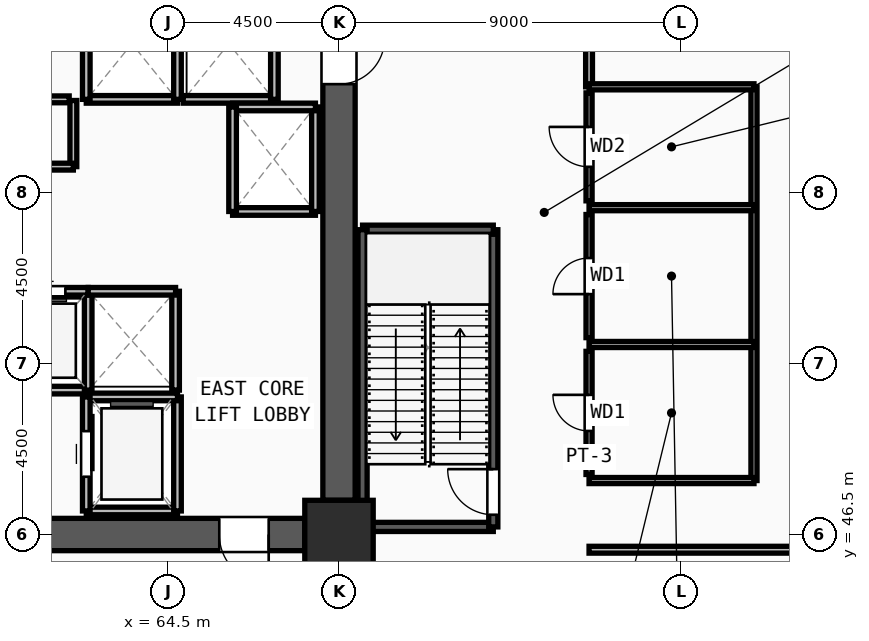
"""IFC4 building model, lengths in metres.
Left out: names, types, materials, properties, quantities, classifications, styles, units other than length and angle.
Written with IfcOpenShell. Run it as: python <this file> out.ifc"""

import sys

from ifc_helpers import new_model, si_unit, direction, frame, frame_2d, origin, origin_2d, place, context, subcontext, project, spatial, rectangle, extrude, source, transform, mapped, element, fill, save


model = new_model("IFC4")
c1 = context("Model", 3, precision=1e-05, world=origin(), true_north=direction((0.0, 1.0)))
c2 = subcontext(c1, "Body", "Model", "MODEL_VIEW")
j1 = project(units=[si_unit("LENGTHUNIT", "METRE"), si_unit("PLANEANGLEUNIT", "RADIAN")], contexts=[c1])
p1 = place(None, origin())
s1 = spatial("IfcSite", under=j1, at=p1, CompositionType="ELEMENT")
p2 = place(p1, origin())
s2 = spatial("IfcBuilding", under=s1, at=p2, CompositionType="ELEMENT")
p3 = place(p2, frame((0.0, 0.0, 23.4)))
s3 = spatial("IfcBuildingStorey", under=s2, at=p3, CompositionType="ELEMENT", Elevation=23.4)
m1 = source(origin(), c2, "Body", "SweptSolid", [
    extrude(rectangle(XDim=1.8, YDim=1.8, at=origin_2d()), origin(), (0.0, 0.0, 1.0), 5.1),
])
p4 = place(p3, frame((69.0, 46.5, 0.0), z_axis=(0.0, 0.0, 1.0), x_axis=(1.0, 0.0, 0.0)))
e1 = element("IfcColumn", 1, at=p4, inside=s3, PredefinedType="COLUMN", context=c2, shape_type="MappedRepresentation", body=[
    mapped(m1, transform((0.0, 0.0, 0.0), x_axis=(1.0, 0.0, 0.0), y_axis=(0.0, 1.0, 0.0), z_axis=(0.0, 0.0, 1.0), scale=1.0)),
])
p5 = place(p3, frame((69.0, 60.6, 0.0), z_axis=(0.0, 0.0, 1.0), x_axis=(0.0, -1.0, 0.0)))
e2 = element("IfcWall", 2, at=p5, inside=s3, PredefinedType="SHEAR", context=c2, shape_type="SweptSolid", body=[
    extrude(rectangle(XDim=13.2, YDim=0.85, at=frame_2d((6.6, 0.0))), origin(), (0.0, 0.0, 1.0), 4.82),
])
m2 = source(origin(), c2, "Body", "SweptSolid", [
    extrude(rectangle(XDim=1.2, YDim=2.2, at=frame_2d((0.6, 1.1))), frame((0.0, 0.435, 0.0), z_axis=(0.0, -1.0, 0.0), x_axis=(1.0, 0.0, 0.0)), (0.0, 0.0, 1.0), 0.87),
])
p6 = place(p5, frame((1.05, 0.0, 0.0)))
e3 = element("IfcOpeningElement", 3, at=p6, cuts=e2, PredefinedType="OPENING", context=c2, shape_type="MappedRepresentation", body=[
    mapped(m2, transform((0.0, 0.0, 0.0), x_axis=(1.0, 0.0, 0.0), y_axis=(0.0, 1.0, 0.0), z_axis=(0.0, 0.0, 1.0), scale=1.0)),
])
p7 = place(p3, frame((68.1, 46.5, 0.0), z_axis=(0.0, 0.0, 1.0), x_axis=(-1.0, 0.0, 0.0)))
e4 = element("IfcWall", 4, at=p7, inside=s3, PredefinedType="SHEAR", context=c2, shape_type="SweptSolid", body=[
    extrude(rectangle(XDim=7.2, YDim=0.85, at=frame_2d((3.6, 0.0))), origin(), (0.0, 0.0, 1.0), 4.82),
])
m3 = source(origin(), c2, "Body", "SweptSolid", [
    extrude(rectangle(XDim=1.3, YDim=2.2, at=frame_2d((0.65, 1.1))), frame((0.0, 0.435, 0.0), z_axis=(0.0, -1.0, 0.0), x_axis=(1.0, 0.0, 0.0)), (0.0, 0.0, 1.0), 0.87),
])
p8 = place(p7, frame((0.95, 0.0, 0.0)))
e5 = element("IfcOpeningElement", 5, at=p8, cuts=e4, PredefinedType="OPENING", context=c2, shape_type="MappedRepresentation", body=[
    mapped(m3, transform((0.0, 0.0, 0.0), x_axis=(1.0, 0.0, 0.0), y_axis=(0.0, 1.0, 0.0), z_axis=(0.0, 0.0, 1.0), scale=1.0)),
])
p9 = place(p3, frame((69.62, 46.7, 0.0), z_axis=(0.0, 0.0, 1.0), x_axis=(1.0, 0.0, 0.0)))
e6 = element("IfcWall", 6, at=p9, inside=s3, PredefinedType="SOLIDWALL", context=c2, shape_type="SweptSolid", body=[
    extrude(rectangle(XDim=3.44, YDim=0.24, at=frame_2d((1.72, 0.0))), origin(), (0.0, 0.0, 1.0), 3.335),
])
p10 = place(p3, frame((73.06, 46.7, 0.0), z_axis=(0.0, 0.0, 1.0), x_axis=(0.0, 1.0, 0.0)))
e7 = element("IfcWall", 7, at=p10, inside=s3, PredefinedType="SOLIDWALL", context=c2, shape_type="SweptSolid", body=[
    extrude(rectangle(XDim=7.82, YDim=0.24, at=frame_2d((3.91, 0.0))), origin(), (0.0, 0.0, 1.0), 4.82),
])
m4 = source(origin(), c2, "Body", "SweptSolid", [
    extrude(rectangle(XDim=1.2, YDim=2.2, at=frame_2d((0.6, 1.1))), frame((0.0, 0.13, 0.0), z_axis=(0.0, -1.0, 0.0), x_axis=(1.0, 0.0, 0.0)), (0.0, 0.0, 1.0), 0.26),
])
p11 = place(p10, frame((0.32, 0.0, 0.0)))
e8 = element("IfcOpeningElement", 8, at=p11, cuts=e7, PredefinedType="OPENING", context=c2, shape_type="MappedRepresentation", body=[
    mapped(m4, transform((0.0, 0.0, 0.0), x_axis=(1.0, 0.0, 0.0), y_axis=(0.0, 1.0, 0.0), z_axis=(0.0, 0.0, 1.0), scale=1.0)),
])
p12 = place(p3, frame((73.06, 54.52, 0.0), z_axis=(0.0, 0.0, 1.0), x_axis=(-1.0, 0.0, 0.0)))
e9 = element("IfcWall", 9, at=p12, inside=s3, PredefinedType="SOLIDWALL", context=c2, shape_type="SweptSolid", body=[
    extrude(rectangle(XDim=3.44, YDim=0.24, at=frame_2d((1.72, 0.0))), origin(), (0.0, 0.0, 1.0), 4.82),
])
p13 = place(p3, frame((69.62, 54.52, 0.0), z_axis=(0.0, 0.0, 1.0), x_axis=(0.0, -1.0, 0.0)))
e10 = element("IfcWall", 10, at=p13, inside=s3, PredefinedType="SOLIDWALL", context=c2, shape_type="SweptSolid", body=[
    extrude(rectangle(XDim=7.82, YDim=0.24, at=frame_2d((3.91, 0.0))), origin(), (0.0, 0.0, 1.0), 4.82),
])
p14 = place(p3, frame((62.35, 47.12, 0.0), z_axis=(0.0, 0.0, 1.0), x_axis=(1.0, 0.0, 0.0)))
e11 = element("IfcWall", 11, at=p14, inside=s3, PredefinedType="SOLIDWALL", context=c2, shape_type="SweptSolid", body=[
    extrude(rectangle(XDim=2.4, YDim=0.2, at=frame_2d((1.2, 0.0))), origin(), (0.0, 0.0, 1.0), 4.82),
])
p15 = place(p3, frame((64.75, 47.12, 0.0), z_axis=(0.0, 0.0, 1.0), x_axis=(0.0, 1.0, 0.0)))
e12 = element("IfcWall", 12, at=p15, inside=s3, PredefinedType="SOLIDWALL", context=c2, shape_type="SweptSolid", body=[
    extrude(rectangle(XDim=3.0, YDim=0.2, at=frame_2d((1.5, 0.0))), origin(), (0.0, 0.0, 1.0), 4.82),
])
p16 = place(p3, frame((64.75, 50.12, 0.0), z_axis=(0.0, 0.0, 1.0), x_axis=(-1.0, 0.0, 0.0)))
e13 = element("IfcWall", 13, at=p16, inside=s3, PredefinedType="SOLIDWALL", context=c2, shape_type="SweptSolid", body=[
    extrude(rectangle(XDim=2.4, YDim=0.2, at=frame_2d((1.2, 0.0))), origin(), (0.0, 0.0, 1.0), 4.82),
])
p17 = place(p3, frame((62.35, 50.12, 0.0), z_axis=(0.0, 0.0, 1.0), x_axis=(0.0, -1.0, 0.0)))
e14 = element("IfcWall", 14, at=p17, inside=s3, PredefinedType="SOLIDWALL", context=c2, shape_type="SweptSolid", body=[
    extrude(rectangle(XDim=3.0, YDim=0.2, at=frame_2d((1.5, 0.0))), origin(), (0.0, 0.0, 1.0), 4.82),
])
m5 = source(origin(), c2, "Body", "SweptSolid", [
    extrude(rectangle(XDim=1.2, YDim=2.3, at=frame_2d((0.6, 1.15))), frame((0.0, 0.11, 0.0), z_axis=(0.0, -1.0, 0.0), x_axis=(1.0, 0.0, 0.0)), (0.0, 0.0, 1.0), 0.22),
])
p18 = place(p17, frame((0.9, 0.0, 0.0)))
e15 = element("IfcOpeningElement", 15, at=p18, cuts=e14, PredefinedType="OPENING", context=c2, shape_type="MappedRepresentation", body=[
    mapped(m5, transform((0.0, 0.0, 0.0), x_axis=(1.0, 0.0, 0.0), y_axis=(0.0, 1.0, 0.0), z_axis=(0.0, 0.0, 1.0), scale=1.0)),
])
p19 = place(p3, frame((62.35, 57.95, 0.0), z_axis=(0.0, 0.0, 1.0), x_axis=(1.0, 0.0, 0.0)))
e16 = element("IfcWall", 16, at=p19, inside=s3, PredefinedType="SOLIDWALL", context=c2, shape_type="SweptSolid", body=[
    extrude(rectangle(XDim=2.4, YDim=0.2, at=frame_2d((1.2, 0.0))), origin(), (0.0, 0.0, 1.0), 4.82),
])
for number, where, z_axis, x_axis in (
    (17, (64.75, 57.95, 0.0), (0.0, 0.0, 1.0), (0.0, 1.0, 0.0)),
    (18, (62.35, 60.88, 0.0), (0.0, 0.0, 1.0), (0.0, -1.0, 0.0)),
):
    element("IfcWall", number, at=place(p3, frame(where, z_axis=z_axis, x_axis=x_axis)), inside=s3, PredefinedType="SOLIDWALL", context=c2, shape_type="SweptSolid", body=[
        extrude(rectangle(XDim=2.93, YDim=0.2, at=frame_2d((1.465, 0.0))), origin(), (0.0, 0.0, 1.0), 4.82),
    ])
p20 = place(p3, frame((64.9, 57.95, 0.0), z_axis=(0.0, 0.0, 1.0), x_axis=(1.0, 0.0, 0.0)))
e19 = element("IfcWall", 19, at=p20, inside=s3, PredefinedType="SOLIDWALL", context=c2, shape_type="SweptSolid", body=[
    extrude(rectangle(XDim=2.4, YDim=0.2, at=frame_2d((1.2, 0.0))), origin(), (0.0, 0.0, 1.0), 4.82),
])
p21 = place(p3, frame((67.3, 57.95, 0.0), z_axis=(0.0, 0.0, 1.0), x_axis=(0.0, 1.0, 0.0)))
e20 = element("IfcWall", 20, at=p21, inside=s3, PredefinedType="SOLIDWALL", context=c2, shape_type="SweptSolid", body=[
    extrude(rectangle(XDim=2.93, YDim=0.2, at=frame_2d((1.465, 0.0))), origin(), (0.0, 0.0, 1.0), 4.82),
])
p22 = place(p3, frame((66.2, 55.0, 0.0), z_axis=(0.0, 0.0, 1.0), x_axis=(1.0, 0.0, 0.0)))
e21 = element("IfcWall", 21, at=p22, inside=s3, PredefinedType="SOLIDWALL", context=c2, shape_type="SweptSolid", body=[
    extrude(rectangle(XDim=2.18, YDim=0.2, at=frame_2d((1.09, 0.0))), origin(), (0.0, 0.0, 1.0), 4.82),
])
p23 = place(p3, frame((68.38, 55.0, 0.0), z_axis=(0.0, 0.0, 1.0), x_axis=(0.0, 1.0, 0.0)))
e22 = element("IfcWall", 22, at=p23, inside=s3, PredefinedType="SOLIDWALL", context=c2, shape_type="SweptSolid", body=[
    extrude(rectangle(XDim=2.75, YDim=0.2, at=frame_2d((1.375, 0.0))), origin(), (0.0, 0.0, 1.0), 4.82),
])
p24 = place(p3, frame((68.38, 57.75, 0.0), z_axis=(0.0, 0.0, 1.0), x_axis=(-1.0, 0.0, 0.0)))
e23 = element("IfcWall", 23, at=p24, inside=s3, PredefinedType="SOLIDWALL", context=c2, shape_type="SweptSolid", body=[
    extrude(rectangle(XDim=2.18, YDim=0.2, at=frame_2d((1.09, 0.0))), origin(), (0.0, 0.0, 1.0), 4.82),
])
p25 = place(p3, frame((66.2, 57.75, 0.0), z_axis=(0.0, 0.0, 1.0), x_axis=(0.0, -1.0, 0.0)))
e24 = element("IfcWall", 24, at=p25, inside=s3, PredefinedType="SOLIDWALL", context=c2, shape_type="SweptSolid", body=[
    extrude(rectangle(XDim=2.75, YDim=0.2, at=frame_2d((1.375, 0.0))), origin(), (0.0, 0.0, 1.0), 4.82),
])
p26 = place(p3, frame((60.1, 50.3, 0.0), z_axis=(0.0, 0.0, 1.0), x_axis=(1.0, 0.0, 0.0)))
e25 = element("IfcWall", 25, at=p26, inside=s3, PredefinedType="SOLIDWALL", context=c2, shape_type="SweptSolid", body=[
    extrude(rectangle(XDim=2.3, YDim=0.2, at=frame_2d((1.15, 0.0))), origin(), (0.0, 0.0, 1.0), 4.82),
])
p27 = place(p3, frame((62.4, 50.3, 0.0), z_axis=(0.0, 0.0, 1.0), x_axis=(0.0, 1.0, 0.0)))
e26 = element("IfcWall", 26, at=p27, inside=s3, PredefinedType="SOLIDWALL", context=c2, shape_type="SweptSolid", body=[
    extrude(rectangle(XDim=2.6, YDim=0.2, at=frame_2d((1.3, 0.0))), origin(), (0.0, 0.0, 1.0), 4.82),
])
p28 = place(p3, frame((62.4, 52.9, 0.0), z_axis=(0.0, 0.0, 1.0), x_axis=(-1.0, 0.0, 0.0)))
e27 = element("IfcWall", 27, at=p28, inside=s3, PredefinedType="SOLIDWALL", context=c2, shape_type="SweptSolid", body=[
    extrude(rectangle(XDim=2.3, YDim=0.2, at=frame_2d((1.15, 0.0))), origin(), (0.0, 0.0, 1.0), 4.82),
])
m6 = source(origin(), c2, "Body", "SweptSolid", [
    extrude(rectangle(XDim=1.1, YDim=2.2, at=frame_2d((0.55, 1.1))), frame((0.0, 0.11, 0.0), z_axis=(0.0, -1.0, 0.0), x_axis=(1.0, 0.0, 0.0)), (0.0, 0.0, 1.0), 0.22),
])
p29 = place(p28, frame((0.6, 0.0, 0.0)))
e28 = element("IfcOpeningElement", 28, at=p29, cuts=e27, PredefinedType="OPENING", context=c2, shape_type="MappedRepresentation", body=[
    mapped(m6, transform((0.0, 0.0, 0.0), x_axis=(1.0, 0.0, 0.0), y_axis=(0.0, 1.0, 0.0), z_axis=(0.0, 0.0, 1.0), scale=1.0)),
])
p30 = place(p3, frame((64.7, 50.3, 0.0), z_axis=(0.0, 0.0, 1.0), x_axis=(0.0, 1.0, 0.0)))
e29 = element("IfcWall", 29, at=p30, inside=s3, PredefinedType="SOLIDWALL", context=c2, shape_type="SweptSolid", body=[
    extrude(rectangle(XDim=2.6, YDim=0.2, at=frame_2d((1.3, 0.0))), origin(), (0.0, 0.0, 1.0), 4.82),
])
p31 = place(p3, frame((64.7, 52.9, 0.0), z_axis=(0.0, 0.0, 1.0), x_axis=(-1.0, 0.0, 0.0)))
e30 = element("IfcWall", 30, at=p31, inside=s3, PredefinedType="SOLIDWALL", context=c2, shape_type="SweptSolid", body=[
    extrude(rectangle(XDim=2.3, YDim=0.2, at=frame_2d((1.15, 0.0))), origin(), (0.0, 0.0, 1.0), 4.82),
])
p32 = place(p3, frame((59.84, 57.95, 0.0), z_axis=(0.0, 0.0, 1.0), x_axis=(1.0, 0.0, 0.0)))
e31 = element("IfcWall", 31, at=p32, inside=s3, PredefinedType="PARTITIONING", context=c2, shape_type="SweptSolid", body=[
    extrude(rectangle(XDim=2.06, YDim=0.18, at=frame_2d((1.03, 0.0))), origin(), (0.0, 0.0, 1.0), 4.82),
])
m7 = source(origin(), c2, "Body", "SweptSolid", [
    extrude(rectangle(XDim=0.85, YDim=2.1, at=frame_2d((0.425, 1.05))), frame((0.0, 0.1, 0.0), z_axis=(0.0, -1.0, 0.0), x_axis=(1.0, 0.0, 0.0)), (0.0, 0.0, 1.0), 0.2),
])
p33 = place(p32, frame((0.605, 0.0, 0.0)))
e32 = element("IfcOpeningElement", 32, at=p33, cuts=e31, PredefinedType="OPENING", context=c2, shape_type="MappedRepresentation", body=[
    mapped(m7, transform((0.0, 0.0, 0.0), x_axis=(1.0, 0.0, 0.0), y_axis=(0.0, 1.0, 0.0), z_axis=(0.0, 0.0, 1.0), scale=1.0)),
])
p34 = place(p3, frame((75.58, 48.08, 0.0), z_axis=(0.0, 0.0, 1.0), x_axis=(0.0, 1.0, 0.0)))
e33 = element("IfcWall", 33, at=p34, inside=s3, PredefinedType="PARTITIONING", context=c2, shape_type="SweptSolid", body=[
    extrude(rectangle(XDim=3.24, YDim=0.16, at=frame_2d((1.62, 0.0))), origin(), (0.0, 0.0, 1.0), 4.82),
])
m8 = source(origin(), c2, "Body", "SweptSolid", [
    extrude(rectangle(XDim=0.95, YDim=2.15, at=frame_2d((0.475, 1.075))), frame((0.0, 0.09, 0.0), z_axis=(0.0, -1.0, 0.0), x_axis=(1.0, 0.0, 0.0)), (0.0, 0.0, 1.0), 0.18),
])
p35 = place(p34, frame((1.145, 0.0, 0.0)))
e34 = element("IfcOpeningElement", 34, at=p35, cuts=e33, PredefinedType="OPENING", context=c2, shape_type="MappedRepresentation", body=[
    mapped(m8, transform((0.0, 0.0, 0.0), x_axis=(1.0, 0.0, 0.0), y_axis=(0.0, 1.0, 0.0), z_axis=(0.0, 0.0, 1.0), scale=1.0)),
])
p36 = place(p3, frame((75.58, 51.68, 0.0), z_axis=(0.0, 0.0, 1.0), x_axis=(0.0, 1.0, 0.0)))
e35 = element("IfcWall", 35, at=p36, inside=s3, PredefinedType="PARTITIONING", context=c2, shape_type="SweptSolid", body=[
    extrude(rectangle(XDim=3.24, YDim=0.16, at=frame_2d((1.62, 0.0))), origin(), (0.0, 0.0, 1.0), 4.82),
])
p37 = place(p36, frame((1.145, 0.0, 0.0)))
e36 = element("IfcOpeningElement", 36, at=p37, cuts=e35, PredefinedType="OPENING", context=c2, shape_type="MappedRepresentation", body=[
    mapped(m8, transform((0.0, 0.0, 0.0), x_axis=(1.0, 0.0, 0.0), y_axis=(0.0, 1.0, 0.0), z_axis=(0.0, 0.0, 1.0), scale=1.0)),
])
p38 = place(p3, frame((75.58, 55.28, 0.0), z_axis=(0.0, 0.0, 1.0), x_axis=(0.0, 1.0, 0.0)))
e37 = element("IfcWall", 37, at=p38, inside=s3, PredefinedType="PARTITIONING", context=c2, shape_type="SweptSolid", body=[
    extrude(rectangle(XDim=2.84, YDim=0.16, at=frame_2d((1.42, 0.0))), origin(), (0.0, 0.0, 1.0), 4.82),
])
m9 = source(origin(), c2, "Body", "SweptSolid", [
    extrude(rectangle(XDim=1.05, YDim=2.15, at=frame_2d((0.525, 1.075))), frame((0.0, 0.09, 0.0), z_axis=(0.0, -1.0, 0.0), x_axis=(1.0, 0.0, 0.0)), (0.0, 0.0, 1.0), 0.18),
])
p39 = place(p38, frame((0.895, 0.0, 0.0)))
e38 = element("IfcOpeningElement", 38, at=p39, cuts=e37, PredefinedType="OPENING", context=c2, shape_type="MappedRepresentation", body=[
    mapped(m9, transform((0.0, 0.0, 0.0), x_axis=(1.0, 0.0, 0.0), y_axis=(0.0, 1.0, 0.0), z_axis=(0.0, 0.0, 1.0), scale=1.0)),
])
p40 = place(p3, frame((75.58, 58.28, 0.0), z_axis=(0.0, 0.0, 1.0), x_axis=(0.0, 1.0, 0.0)))
e39 = element("IfcWall", 39, at=p40, inside=s3, PredefinedType="PARTITIONING", context=c2, shape_type="SweptSolid", body=[
    extrude(rectangle(XDim=9.82, YDim=0.18, at=frame_2d((4.91, 0.0))), origin(), (0.0, 0.0, 1.0), 4.82),
])
m10 = source(origin(), c2, "Body", "SweptSolid", [
    extrude(rectangle(XDim=1.5, YDim=2.2, at=frame_2d((0.75, 1.1))), frame((0.0, 0.1, 0.0), z_axis=(0.0, -1.0, 0.0), x_axis=(1.0, 0.0, 0.0)), (0.0, 0.0, 1.0), 0.2),
])
p41 = place(p40, frame((4.16, 0.0, 0.0)))
e40 = element("IfcOpeningElement", 40, at=p41, cuts=e39, PredefinedType="OPENING", context=c2, shape_type="MappedRepresentation", body=[
    mapped(m10, transform((0.0, 0.0, 0.0), x_axis=(1.0, 0.0, 0.0), y_axis=(0.0, 1.0, 0.0), z_axis=(0.0, 0.0, 1.0), scale=1.0)),
])
p42 = place(p3, frame((62.01, 56.18, 0.0), z_axis=(0.0, 0.0, 1.0), x_axis=(0.0, 1.0, 0.0)))
e41 = element("IfcWall", 41, at=p42, inside=s3, PredefinedType="PARTITIONING", context=c2, shape_type="SweptSolid", body=[
    extrude(rectangle(XDim=1.74, YDim=0.18, at=frame_2d((0.87, 0.0))), origin(), (0.0, 0.0, 1.0), 4.82),
])
p43 = place(p3, frame((59.72, 56.18, 0.0), z_axis=(0.0, 0.0, 1.0), x_axis=(1.0, 0.0, 0.0)))
e42 = element("IfcWall", 42, at=p43, inside=s3, PredefinedType="PARTITIONING", context=c2, shape_type="SweptSolid", body=[
    extrude(rectangle(XDim=2.29, YDim=0.18, at=frame_2d((1.145, 0.0))), origin(), (0.0, 0.0, 1.0), 4.82),
])
p44 = place(p3, frame((79.92, 47.92, 0.0), z_axis=(0.0, 0.0, 1.0), x_axis=(0.0, 1.0, 0.0)))
e43 = element("IfcWall", 43, at=p44, inside=s3, PredefinedType="PARTITIONING", context=c2, shape_type="SweptSolid", body=[
    extrude(rectangle(XDim=10.36, YDim=0.16, at=frame_2d((5.18, 0.0))), origin(), (0.0, 0.0, 1.0), 4.82),
])
for number, where, z_axis, x_axis in (
    (44, (75.58, 47.92, 0.0), (0.0, 0.0, 1.0), (1.0, 0.0, 0.0)),
    (45, (75.58, 51.5, 0.0), (0.0, 0.0, 1.0), (1.0, 0.0, 0.0)),
    (46, (75.58, 55.1, 0.0), (0.0, 0.0, 1.0), (1.0, 0.0, 0.0)),
    (47, (75.58, 58.28, 0.0), (0.0, 0.0, 1.0), (1.0, 0.0, 0.0)),
):
    element("IfcWall", number, at=place(p3, frame(where, z_axis=z_axis, x_axis=x_axis)), inside=s3, PredefinedType="PARTITIONING", context=c2, shape_type="SweptSolid", body=[
        extrude(rectangle(XDim=4.34, YDim=0.16, at=frame_2d((2.17, 0.0))), origin(), (0.0, 0.0, 1.0), 4.82),
    ])
p45 = place(p3, frame((75.58, 46.1, 0.0), z_axis=(0.0, 0.0, 1.0), x_axis=(1.0, 0.0, 0.0)))
e48 = element("IfcWall", 48, at=p45, inside=s3, PredefinedType="PARTITIONING", context=c2, shape_type="SweptSolid", body=[
    extrude(rectangle(XDim=20.795, YDim=0.18, at=frame_2d((10.397, 0.0))), origin(), (0.0, 0.0, 1.0), 4.82),
])
m11 = source(origin(), c2, "Body", "SweptSolid", [
    extrude(rectangle(XDim=1.3, YDim=2.2, at=frame_2d((0.65, 1.1))), frame((0.0, 0.025, 0.0), z_axis=(0.0, -1.0, 0.0), x_axis=(1.0, 0.0, 0.0)), (0.0, 0.0, 1.0), 0.05),
])
p46 = place(p8, origin())
e49 = element("IfcDoor", 49, at=p46, inside=s3, OperationType="SINGLE_SWING_LEFT", PredefinedType="DOOR", context=c2, shape_type="MappedRepresentation", body=[
    mapped(m11, transform((0.0, 0.0, 0.0), x_axis=(1.0, 0.0, 0.0), y_axis=(0.0, 1.0, 0.0), z_axis=(0.0, 0.0, 1.0), scale=1.0)),
])
fill(e5, e49)
m12 = source(origin(), c2, "Body", "SweptSolid", [
    extrude(rectangle(XDim=1.2, YDim=2.2, at=frame_2d((0.6, 1.1))), frame((0.0, 0.025, 0.0), z_axis=(0.0, -1.0, 0.0), x_axis=(1.0, 0.0, 0.0)), (0.0, 0.0, 1.0), 0.05),
])
p47 = place(p6, origin())
e50 = element("IfcDoor", 50, at=p47, inside=s3, OperationType="SINGLE_SWING_LEFT", PredefinedType="DOOR", context=c2, shape_type="MappedRepresentation", body=[
    mapped(m12, transform((0.0, 0.0, 0.0), x_axis=(1.0, 0.0, 0.0), y_axis=(0.0, 1.0, 0.0), z_axis=(0.0, 0.0, 1.0), scale=1.0)),
])
fill(e3, e50)
p48 = place(p11, origin())
e51 = element("IfcDoor", 51, at=p48, inside=s3, OperationType="SINGLE_SWING_RIGHT", PredefinedType="DOOR", context=c2, shape_type="MappedRepresentation", body=[
    mapped(m12, transform((0.0, 0.0, 0.0), x_axis=(1.0, 0.0, 0.0), y_axis=(0.0, 1.0, 0.0), z_axis=(0.0, 0.0, 1.0), scale=1.0)),
])
fill(e8, e51)
m13 = source(origin(), c2, "Body", "SweptSolid", [
    extrude(rectangle(XDim=1.2, YDim=2.3, at=frame_2d((0.6, 1.15))), frame((0.0, 0.025, 0.0), z_axis=(0.0, -1.0, 0.0), x_axis=(1.0, 0.0, 0.0)), (0.0, 0.0, 1.0), 0.05),
])
p49 = place(p18, origin())
e52 = element("IfcDoor", 52, at=p49, inside=s3, OperationType="SLIDING_TO_LEFT", PredefinedType="DOOR", context=c2, shape_type="MappedRepresentation", body=[
    mapped(m13, transform((0.0, 0.0, 0.0), x_axis=(1.0, 0.0, 0.0), y_axis=(0.0, 1.0, 0.0), z_axis=(0.0, 0.0, 1.0), scale=1.0)),
])
fill(e15, e52)
m14 = source(origin(), c2, "Body", "SweptSolid", [
    extrude(rectangle(XDim=1.1, YDim=2.2, at=frame_2d((0.55, 1.1))), frame((0.0, 0.025, 0.0), z_axis=(0.0, -1.0, 0.0), x_axis=(1.0, 0.0, 0.0)), (0.0, 0.0, 1.0), 0.05),
])
p50 = place(p29, origin())
e53 = element("IfcDoor", 53, at=p50, inside=s3, OperationType="SLIDING_TO_LEFT", PredefinedType="DOOR", context=c2, shape_type="MappedRepresentation", body=[
    mapped(m14, transform((0.0, 0.0, 0.0), x_axis=(1.0, 0.0, 0.0), y_axis=(0.0, 1.0, 0.0), z_axis=(0.0, 0.0, 1.0), scale=1.0)),
])
fill(e28, e53)
m15 = source(origin(), c2, "Body", "SweptSolid", [
    extrude(rectangle(XDim=0.95, YDim=2.15, at=frame_2d((0.475, 1.075))), frame((0.0, 0.025, 0.0), z_axis=(0.0, -1.0, 0.0), x_axis=(1.0, 0.0, 0.0)), (0.0, 0.0, 1.0), 0.05),
])
p51 = place(p35, origin())
e54 = element("IfcDoor", 54, at=p51, inside=s3, OperationType="SINGLE_SWING_RIGHT", PredefinedType="DOOR", context=c2, shape_type="MappedRepresentation", body=[
    mapped(m15, transform((0.0, 0.0, 0.0), x_axis=(1.0, 0.0, 0.0), y_axis=(0.0, 1.0, 0.0), z_axis=(0.0, 0.0, 1.0), scale=1.0)),
])
fill(e34, e54)
p52 = place(p37, origin())
e55 = element("IfcDoor", 55, at=p52, inside=s3, OperationType="SINGLE_SWING_LEFT", PredefinedType="DOOR", context=c2, shape_type="MappedRepresentation", body=[
    mapped(m15, transform((0.0, 0.0, 0.0), x_axis=(1.0, 0.0, 0.0), y_axis=(0.0, 1.0, 0.0), z_axis=(0.0, 0.0, 1.0), scale=1.0)),
])
fill(e36, e55)
m16 = source(origin(), c2, "Body", "SweptSolid", [
    extrude(rectangle(XDim=1.05, YDim=2.15, at=frame_2d((0.525, 1.075))), frame((0.0, 0.025, 0.0), z_axis=(0.0, -1.0, 0.0), x_axis=(1.0, 0.0, 0.0)), (0.0, 0.0, 1.0), 0.05),
])
p53 = place(p39, origin())
e56 = element("IfcDoor", 56, at=p53, inside=s3, OperationType="SINGLE_SWING_RIGHT", PredefinedType="DOOR", context=c2, shape_type="MappedRepresentation", body=[
    mapped(m16, transform((0.0, 0.0, 0.0), x_axis=(1.0, 0.0, 0.0), y_axis=(0.0, 1.0, 0.0), z_axis=(0.0, 0.0, 1.0), scale=1.0)),
])
fill(e38, e56)
save(model, sys.argv[1])
